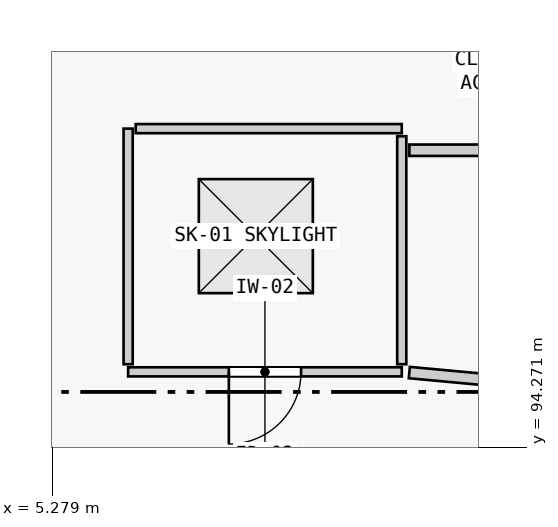
"""IFC4 building model, lengths in metres.
Left out: names, types, materials, properties, quantities, classifications, styles, units other than length and angle.
Written with IfcOpenShell. Run it as: python <this file> out.ifc"""

import sys

from ifc_helpers import new_model, si_unit, direction, frame, frame_2d, origin, origin_2d, place, context, subcontext, project, spatial, rectangle, extrude, element, fill, save


model = new_model("IFC4")
c1 = context("Model", 3, precision=1e-05, world=origin(), true_north=direction((0.0, 1.0)))
c2 = subcontext(c1, "Body", "Model", "MODEL_VIEW")
j1 = project(units=[si_unit("LENGTHUNIT", "METRE"), si_unit("PLANEANGLEUNIT", "RADIAN")], contexts=[c1])
p1 = place(None, origin())
s1 = spatial("IfcSite", under=j1, at=p1, CompositionType="ELEMENT")
p2 = place(p1, origin())
s2 = spatial("IfcBuilding", under=s1, at=p2, CompositionType="ELEMENT")
p3 = place(p2, origin())
s3 = spatial("IfcBuildingStorey", under=s2, at=p3, CompositionType="ELEMENT", Elevation=0.0)
p4 = place(p3, frame((9.88, 95.264, 0.0), z_axis=(0.0, 0.0, 1.0), x_axis=(-1.0, 0.0, 0.0)))
e1 = element("IfcWall", 1, at=p4, inside=s3, PredefinedType="PARTITIONING", context=c2, shape_type="SweptSolid", body=[
    extrude(rectangle(XDim=3.6, YDim=0.12, at=frame_2d((1.8, 0.0))), origin(), (0.0, 0.0, 1.0), 4.6),
])
p5 = place(p4, frame((1.325, 0.0, 0.0)))
e2 = element("IfcOpeningElement", 2, at=p5, cuts=e1, PredefinedType="OPENING", context=c2, shape_type="SweptSolid", body=[
    extrude(rectangle(XDim=0.95, YDim=2.15, at=frame_2d((0.475, 1.075))), frame((0.0, 0.07, 0.0), z_axis=(0.0, -1.0, 0.0), x_axis=(1.0, 0.0, 0.0)), (0.0, 0.0, 1.0), 0.14),
])
p6 = place(p3, frame((6.28, 95.364, 0.0), z_axis=(0.0, 0.0, 1.0), x_axis=(0.0, 1.0, 0.0)))
e3 = element("IfcWall", 3, at=p6, inside=s3, PredefinedType="PARTITIONING", context=c2, shape_type="SweptSolid", body=[
    extrude(rectangle(XDim=3.1, YDim=0.12, at=frame_2d((1.55, 0.0))), origin(), (0.0, 0.0, 1.0), 5.08),
])
p7 = place(p3, frame((6.38, 98.464, 0.0), z_axis=(0.0, 0.0, 1.0), x_axis=(1.0, 0.0, 0.0)))
e4 = element("IfcWall", 4, at=p7, inside=s3, PredefinedType="PARTITIONING", context=c2, shape_type="SweptSolid", body=[
    extrude(rectangle(XDim=3.5, YDim=0.12, at=frame_2d((1.75, 0.0))), origin(), (0.0, 0.0, 1.0), 4.6),
])
p8 = place(p3, frame((9.88, 98.364, 0.0), z_axis=(0.0, 0.0, 1.0), x_axis=(0.0, -1.0, 0.0)))
e5 = element("IfcWall", 5, at=p8, inside=s3, PredefinedType="PARTITIONING", context=c2, shape_type="SweptSolid", body=[
    extrude(rectangle(XDim=3.0, YDim=0.12, at=frame_2d((1.5, 0.0))), origin(), (0.0, 0.0, 1.0), 5.08),
])
p9 = place(p3, frame((14.565, 98.18, 0.0), z_axis=(0.0, 0.0, 1.0), x_axis=(-1.0, 0.0, 0.0)))
e6 = element("IfcWall", 6, at=p9, inside=s3, PredefinedType="PARTITIONING", context=c2, shape_type="SweptSolid", body=[
    extrude(rectangle(XDim=4.585, YDim=0.15, at=frame_2d((2.292, 0.0))), origin(), (0.0, 0.0, 1.0), 4.36),
])
p10 = place(p3, frame((9.979, 95.255, 0.0), z_axis=(0.0, 0.0, 1.0), x_axis=(0.995717002526, -0.092453506591, 0.0)))
e7 = element("IfcWall", 7, at=p10, inside=s3, PredefinedType="PARTITIONING", context=c2, shape_type="SweptSolid", body=[
    extrude(rectangle(XDim=4.706, YDim=0.15, at=frame_2d((2.353, 0.0))), origin(), (0.0, 0.0, 1.0), 4.36),
])
p11 = place(p2, frame((0.0, 0.0, 26.7)))
p12 = place(p11, frame((0.0, 0.0, -21.56)))
p13 = place(p12, frame((7.96, 97.05, 0.0)))
p14 = place(p13, frame((0.0, 0.0, 0.21)))
e8 = element("IfcWindow", 8, at=p14, inside=s3, PartitioningType="SINGLE_PANEL", PredefinedType="SKYLIGHT", context=c2, shape_type="SweptSolid", body=[
    extrude(rectangle(XDim=1.5, YDim=1.5, at=origin_2d()), origin(), (0.0, 0.0, 1.0), 0.05),
])
p15 = place(p5, origin())
e9 = element("IfcDoor", 9, at=p15, inside=s3, OperationType="SINGLE_SWING_RIGHT", PredefinedType="DOOR", context=c2, shape_type="SweptSolid", body=[
    extrude(rectangle(XDim=0.95, YDim=2.15, at=frame_2d((0.475, 1.075))), frame((0.0, 0.025, 0.0), z_axis=(0.0, -1.0, 0.0), x_axis=(1.0, 0.0, 0.0)), (0.0, 0.0, 1.0), 0.05),
])
fill(e2, e9)
save(model, sys.argv[1])
